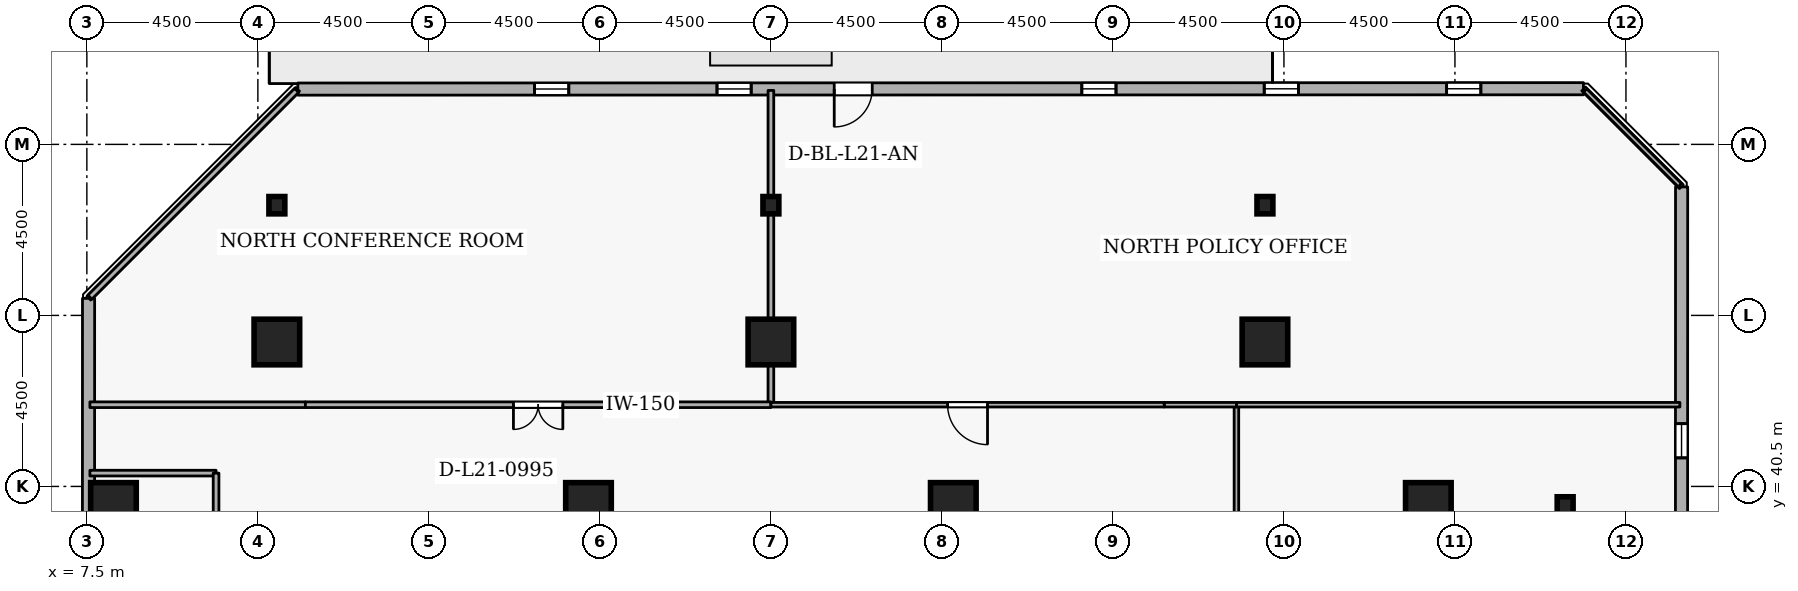
"""IFC4 building model, lengths in metres.
Left out: names, types, materials, properties, quantities, classifications, styles, units other than length and angle.
Written with IfcOpenShell. Run it as: python <this file> out.ifc"""

import sys

from ifc_helpers import new_model, si_unit, direction, frame, frame_2d, origin, origin_2d, place, context, subcontext, project, spatial, rectangle, i_section, extrude, element, fill, save


model = new_model("IFC4")
c1 = context("Model", 3, precision=1e-05, world=origin(), true_north=direction((0.0, 1.0)))
c2 = subcontext(c1, "Body", "Model", "MODEL_VIEW")
j1 = project(units=[si_unit("LENGTHUNIT", "METRE"), si_unit("PLANEANGLEUNIT", "RADIAN")], contexts=[c1])
p1 = place(None, origin())
s1 = spatial("IfcSite", under=j1, at=p1, CompositionType="ELEMENT")
p2 = place(p1, origin())
s2 = spatial("IfcBuilding", under=s1, at=p2, CompositionType="ELEMENT")
p3 = place(p2, frame((0.0, 0.0, 83.7)))
s3 = spatial("IfcBuildingStorey", under=s2, at=p3, CompositionType="ELEMENT", Elevation=83.7)
for number, where, z_axis, x_axis in (
    (1, (42.8, 40.0, 0.0), (0.0, 0.0, 1.0), (1.0, 0.0, 0.0)),
    (2, (12.5, 44.3, 0.0), (0.0, 0.0, 1.0), (1.0, 0.0, 0.0)),
    (3, (25.5, 44.3, 0.0), (0.0, 0.0, 1.0), (1.0, 0.0, 0.0)),
    (4, (38.5, 44.3, 0.0), (0.0, 0.0, 1.0), (1.0, 0.0, 0.0)),
    (5, (8.2, 40.0, 0.0), (0.0, 0.0, 1.0), (1.0, 0.0, 0.0)),
    (6, (20.7, 40.0, 0.0), (0.0, 0.0, 1.0), (1.0, 0.0, 0.0)),
    (7, (30.3, 40.0, 0.0), (0.0, 0.0, 1.0), (1.0, 0.0, 0.0)),
):
    element("IfcColumn", number, at=place(p3, frame(where, z_axis=z_axis, x_axis=x_axis)), inside=s3, PredefinedType="COLUMN", context=c2, shape_type="SweptSolid", body=[
        extrude(rectangle(XDim=1.2, YDim=1.2, at=origin_2d()), origin(), (0.0, 0.0, 1.0), 3.6),
    ])
for number, where, z_axis, x_axis in (
    (8, (46.4, 40.0, 0.0), (0.0, 0.0, 1.0), (1.0, 0.0, 0.0)),
    (9, (12.5, 47.9, 0.0), (0.0, 0.0, 1.0), (1.0, 0.0, 0.0)),
    (10, (25.5, 47.9, 0.0), (0.0, 0.0, 1.0), (1.0, 0.0, 0.0)),
    (11, (38.5, 47.9, 0.0), (0.0, 0.0, 1.0), (1.0, 0.0, 0.0)),
):
    element("IfcColumn", number, at=place(p3, frame(where, z_axis=z_axis, x_axis=x_axis)), inside=s3, PredefinedType="COLUMN", context=c2, shape_type="SweptSolid", body=[
        extrude(i_section(OverallWidth=0.418, OverallDepth=0.456, WebThickness=0.042, FlangeThickness=0.067, FilletRadius=0.015, at=origin_2d()), origin(), (0.0, 0.0, 1.0), 3.6),
    ])
p4 = place(p3, frame((49.455, 14.552, 0.0), z_axis=(0.0, 0.0, 1.0), x_axis=(0.000281454314, 0.999999960392, 0.0)))
e12 = element("IfcWall", 12, at=p4, inside=s3, PredefinedType="STANDARD", context=c2, shape_type="SweptSolid", body=[
    extrude(rectangle(XDim=33.83, YDim=0.32, at=frame_2d((16.915, 0.0))), origin(), (0.0, 0.0, 1.0), 2.7),
])
p5 = place(p4, frame((2.7, 0.0, 0.72)))
e13 = element("IfcOpeningElement", 13, at=p5, cuts=e12, PredefinedType="OPENING", context=c2, shape_type="SweptSolid", body=[
    extrude(rectangle(XDim=0.9, YDim=1.75, at=frame_2d((0.45, 0.875))), frame((0.0, 0.17, 0.0), z_axis=(0.0, -1.0, 0.0), x_axis=(1.0, 0.0, 0.0)), (0.0, 0.0, 1.0), 0.34),
])
p6 = place(p4, frame((7.5, 0.0, 0.72)))
e14 = element("IfcOpeningElement", 14, at=p6, cuts=e12, PredefinedType="OPENING", context=c2, shape_type="SweptSolid", body=[
    extrude(rectangle(XDim=0.9, YDim=1.75, at=frame_2d((0.45, 0.875))), frame((0.0, 0.17, 0.0), z_axis=(0.0, -1.0, 0.0), x_axis=(1.0, 0.0, 0.0)), (0.0, 0.0, 1.0), 0.34),
])
p7 = place(p4, frame((17.1, 0.0, 0.72)))
e15 = element("IfcOpeningElement", 15, at=p7, cuts=e12, PredefinedType="OPENING", context=c2, shape_type="SweptSolid", body=[
    extrude(rectangle(XDim=0.9, YDim=1.75, at=frame_2d((0.45, 0.875))), frame((0.0, 0.17, 0.0), z_axis=(0.0, -1.0, 0.0), x_axis=(1.0, 0.0, 0.0)), (0.0, 0.0, 1.0), 0.34),
])
p8 = place(p4, frame((21.9, 0.0, 0.72)))
e16 = element("IfcOpeningElement", 16, at=p8, cuts=e12, PredefinedType="OPENING", context=c2, shape_type="SweptSolid", body=[
    extrude(rectangle(XDim=0.9, YDim=1.75, at=frame_2d((0.45, 0.875))), frame((0.0, 0.17, 0.0), z_axis=(0.0, -1.0, 0.0), x_axis=(1.0, 0.0, 0.0)), (0.0, 0.0, 1.0), 0.34),
])
p9 = place(p4, frame((26.7, 0.0, 0.72)))
e17 = element("IfcOpeningElement", 17, at=p9, cuts=e12, PredefinedType="OPENING", context=c2, shape_type="SweptSolid", body=[
    extrude(rectangle(XDim=0.9, YDim=1.75, at=frame_2d((0.45, 0.875))), frame((0.0, 0.17, 0.0), z_axis=(0.0, -1.0, 0.0), x_axis=(1.0, 0.0, 0.0)), (0.0, 0.0, 1.0), 0.34),
])
p10 = place(p3, frame((46.881, 50.965, 0.0), z_axis=(0.0, 0.0, 1.0), x_axis=(-0.999999960392, -0.000281454314, 0.0)))
e18 = element("IfcWall", 18, at=p10, inside=s3, PredefinedType="STANDARD", context=c2, shape_type="SweptSolid", body=[
    extrude(rectangle(XDim=33.83, YDim=0.32, at=frame_2d((16.915, 0.0))), origin(), (0.0, 0.0, 1.0), 2.7),
])
p11 = place(p10, frame((18.715, 0.0, 0.0)))
e19 = element("IfcOpeningElement", 19, at=p11, cuts=e18, PredefinedType="OPENING", context=c2, shape_type="SweptSolid", body=[
    extrude(rectangle(XDim=1.0, YDim=2.08, at=frame_2d((0.5, 1.04))), frame((0.0, 0.17, 0.0), z_axis=(0.0, -1.0, 0.0), x_axis=(1.0, 0.0, 0.0)), (0.0, 0.0, 1.0), 0.34),
])
p12 = place(p10, frame((2.7, 0.0, 0.72)))
e20 = element("IfcOpeningElement", 20, at=p12, cuts=e18, PredefinedType="OPENING", context=c2, shape_type="SweptSolid", body=[
    extrude(rectangle(XDim=0.9, YDim=1.75, at=frame_2d((0.45, 0.875))), frame((0.0, 0.17, 0.0), z_axis=(0.0, -1.0, 0.0), x_axis=(1.0, 0.0, 0.0)), (0.0, 0.0, 1.0), 0.34),
])
p13 = place(p10, frame((7.5, 0.0, 0.72)))
e21 = element("IfcOpeningElement", 21, at=p13, cuts=e18, PredefinedType="OPENING", context=c2, shape_type="SweptSolid", body=[
    extrude(rectangle(XDim=0.9, YDim=1.75, at=frame_2d((0.45, 0.875))), frame((0.0, 0.17, 0.0), z_axis=(0.0, -1.0, 0.0), x_axis=(1.0, 0.0, 0.0)), (0.0, 0.0, 1.0), 0.34),
])
p14 = place(p10, frame((12.3, 0.0, 0.72)))
e22 = element("IfcOpeningElement", 22, at=p14, cuts=e18, PredefinedType="OPENING", context=c2, shape_type="SweptSolid", body=[
    extrude(rectangle(XDim=0.9, YDim=1.75, at=frame_2d((0.45, 0.875))), frame((0.0, 0.17, 0.0), z_axis=(0.0, -1.0, 0.0), x_axis=(1.0, 0.0, 0.0)), (0.0, 0.0, 1.0), 0.34),
])
p15 = place(p10, frame((21.9, 0.0, 0.72)))
e23 = element("IfcOpeningElement", 23, at=p15, cuts=e18, PredefinedType="OPENING", context=c2, shape_type="SweptSolid", body=[
    extrude(rectangle(XDim=0.9, YDim=1.75, at=frame_2d((0.45, 0.875))), frame((0.0, 0.17, 0.0), z_axis=(0.0, -1.0, 0.0), x_axis=(1.0, 0.0, 0.0)), (0.0, 0.0, 1.0), 0.34),
])
p16 = place(p10, frame((26.7, 0.0, 0.72)))
e24 = element("IfcOpeningElement", 24, at=p16, cuts=e18, PredefinedType="OPENING", context=c2, shape_type="SweptSolid", body=[
    extrude(rectangle(XDim=0.9, YDim=1.75, at=frame_2d((0.45, 0.875))), frame((0.0, 0.17, 0.0), z_axis=(0.0, -1.0, 0.0), x_axis=(1.0, 0.0, 0.0)), (0.0, 0.0, 1.0), 0.34),
])
p17 = place(p3, frame((7.545, 45.448, 0.0), z_axis=(0.0, 0.0, 1.0), x_axis=(-0.000281454314, -0.999999960392, 0.0)))
e25 = element("IfcWall", 25, at=p17, inside=s3, PredefinedType="STANDARD", context=c2, shape_type="SweptSolid", body=[
    extrude(rectangle(XDim=33.83, YDim=0.32, at=frame_2d((16.915, 0.0))), origin(), (0.0, 0.0, 1.0), 2.7),
])
p18 = place(p17, frame((7.5, 0.0, 0.72)))
e26 = element("IfcOpeningElement", 26, at=p18, cuts=e25, PredefinedType="OPENING", context=c2, shape_type="SweptSolid", body=[
    extrude(rectangle(XDim=0.9, YDim=1.75, at=frame_2d((0.45, 0.875))), frame((0.0, 0.17, 0.0), z_axis=(0.0, -1.0, 0.0), x_axis=(1.0, 0.0, 0.0)), (0.0, 0.0, 1.0), 0.34),
])
p19 = place(p17, frame((12.3, 0.0, 0.72)))
e27 = element("IfcOpeningElement", 27, at=p19, cuts=e25, PredefinedType="OPENING", context=c2, shape_type="SweptSolid", body=[
    extrude(rectangle(XDim=0.9, YDim=1.75, at=frame_2d((0.45, 0.875))), frame((0.0, 0.17, 0.0), z_axis=(0.0, -1.0, 0.0), x_axis=(1.0, 0.0, 0.0)), (0.0, 0.0, 1.0), 0.34),
])
p20 = place(p17, frame((21.9, 0.0, 0.72)))
e28 = element("IfcOpeningElement", 28, at=p20, cuts=e25, PredefinedType="OPENING", context=c2, shape_type="SweptSolid", body=[
    extrude(rectangle(XDim=0.9, YDim=1.75, at=frame_2d((0.45, 0.875))), frame((0.0, 0.17, 0.0), z_axis=(0.0, -1.0, 0.0), x_axis=(1.0, 0.0, 0.0)), (0.0, 0.0, 1.0), 0.34),
])
p21 = place(p17, frame((26.7, 0.0, 0.72)))
e29 = element("IfcOpeningElement", 29, at=p21, cuts=e25, PredefinedType="OPENING", context=c2, shape_type="SweptSolid", body=[
    extrude(rectangle(XDim=0.9, YDim=1.75, at=frame_2d((0.45, 0.875))), frame((0.0, 0.17, 0.0), z_axis=(0.0, -1.0, 0.0), x_axis=(1.0, 0.0, 0.0)), (0.0, 0.0, 1.0), 0.34),
])
p22 = place(p3, frame((7.58, 40.85, 0.0), z_axis=(0.0, 0.0, 1.0), x_axis=(1.0, 0.0, 0.0)))
e30 = element("IfcWall", 30, at=p22, inside=s3, PredefinedType="PARTITIONING", context=c2, shape_type="SweptSolid", body=[
    extrude(rectangle(XDim=3.32, YDim=0.15, at=frame_2d((1.66, 0.0))), origin(), (0.0, 0.0, 1.0), 3.34),
])
p23 = place(p3, frame((10.9, 40.85, 0.0), z_axis=(0.0, 0.0, 1.0), x_axis=(0.0, -1.0, 0.0)))
e31 = element("IfcWall", 31, at=p23, inside=s3, PredefinedType="PARTITIONING", context=c2, shape_type="SweptSolid", body=[
    extrude(rectangle(XDim=4.912, YDim=0.15, at=frame_2d((2.456, 0.0))), origin(), (0.0, 0.0, 1.0), 3.34),
])
p24 = place(p3, frame((37.75, 33.3, 0.0), z_axis=(0.0, 0.0, 1.0), x_axis=(0.0, 1.0, 0.0)))
e32 = element("IfcWall", 32, at=p24, inside=s3, PredefinedType="PARTITIONING", context=c2, shape_type="SweptSolid", body=[
    extrude(rectangle(XDim=9.35, YDim=0.12, at=frame_2d((4.675, 0.0))), origin(), (0.0, 0.0, 1.0), 3.34),
])
p25 = place(p24, frame((4.15, 0.0, 0.0)))
e33 = element("IfcOpeningElement", 33, at=p25, cuts=e32, PredefinedType="OPENING", context=c2, shape_type="SweptSolid", body=[
    extrude(rectangle(XDim=1.05, YDim=2.1, at=frame_2d((0.525, 1.05))), frame((0.0, 0.07, 0.0), z_axis=(0.0, -1.0, 0.0), x_axis=(1.0, 0.0, 0.0)), (0.0, 0.0, 1.0), 0.14),
])
p26 = place(p3, frame((37.75, 42.65, 0.0), z_axis=(0.0, 0.0, 1.0), x_axis=(1.0, 0.0, 0.0)))
e34 = element("IfcWall", 34, at=p26, inside=s3, PredefinedType="PARTITIONING", context=c2, shape_type="SweptSolid", body=[
    extrude(rectangle(XDim=11.67, YDim=0.12, at=frame_2d((5.835, 0.0))), origin(), (0.0, 0.0, 1.0), 3.34),
])
p27 = place(p3, frame((13.25, 42.65, 0.0), z_axis=(0.0, 0.0, 1.0), x_axis=(-1.0, 0.0, 0.0)))
e35 = element("IfcWall", 35, at=p27, inside=s3, PredefinedType="PARTITIONING", context=c2, shape_type="SweptSolid", body=[
    extrude(rectangle(XDim=5.67, YDim=0.15, at=frame_2d((2.835, 0.0))), origin(), (0.0, 0.0, 1.0), 3.34),
])
p28 = place(p3, frame((7.58, 45.48, 0.0), z_axis=(0.0, 0.0, 1.0), x_axis=(0.707106781187, 0.707106781187, 0.0)))
e36 = element("IfcWall", 36, at=p28, inside=s3, PredefinedType="PARTITIONING", context=c2, shape_type="SweptSolid", body=[
    extrude(rectangle(XDim=7.693, YDim=0.15, at=frame_2d((3.846, 0.0))), origin(), (0.0, 0.0, 1.0), 3.34),
])
p29 = place(p3, frame((25.5, 50.92, 0.0), z_axis=(0.0, 0.0, 1.0), x_axis=(0.0, -1.0, 0.0)))
e37 = element("IfcWall", 37, at=p29, inside=s3, PredefinedType="PARTITIONING", context=c2, shape_type="SweptSolid", body=[
    extrude(rectangle(XDim=8.27, YDim=0.15, at=frame_2d((4.135, 0.0))), origin(), (0.0, 0.0, 1.0), 2.882),
])
p30 = place(p3, frame((25.5, 42.65, 0.0), z_axis=(0.0, 0.0, 1.0), x_axis=(-1.0, 0.0, 0.0)))
e38 = element("IfcWall", 38, at=p30, inside=s3, PredefinedType="PARTITIONING", context=c2, shape_type="SweptSolid", body=[
    extrude(rectangle(XDim=12.25, YDim=0.15, at=frame_2d((6.125, 0.0))), origin(), (0.0, 0.0, 1.0), 3.34),
])
p31 = place(p30, frame((5.475, 0.0, 0.0)))
e39 = element("IfcOpeningElement", 39, at=p31, cuts=e38, PredefinedType="OPENING", context=c2, shape_type="SweptSolid", body=[
    extrude(rectangle(XDim=1.3, YDim=2.12, at=frame_2d((0.65, 1.06))), frame((0.0, 0.085, 0.0), z_axis=(0.0, -1.0, 0.0), x_axis=(1.0, 0.0, 0.0)), (0.0, 0.0, 1.0), 0.17),
])
p32 = place(p3, frame((37.75, 42.65, 0.0), z_axis=(0.0, 0.0, 1.0), x_axis=(-1.0, 0.0, 0.0)))
e40 = element("IfcWall", 40, at=p32, inside=s3, PredefinedType="PARTITIONING", context=c2, shape_type="SweptSolid", body=[
    extrude(rectangle(XDim=1.9, YDim=0.12, at=frame_2d((0.95, 0.0))), origin(), (0.0, 0.0, 1.0), 2.895),
])
p33 = place(p3, frame((35.85, 42.65, 0.0), z_axis=(0.0, 0.0, 1.0), x_axis=(-1.0, 0.0, 0.0)))
e41 = element("IfcWall", 41, at=p33, inside=s3, PredefinedType="PARTITIONING", context=c2, shape_type="SweptSolid", body=[
    extrude(rectangle(XDim=10.35, YDim=0.12, at=frame_2d((5.175, 0.0))), origin(), (0.0, 0.0, 1.0), 2.895),
])
p34 = place(p33, frame((4.65, 0.0, 0.0)))
e42 = element("IfcOpeningElement", 42, at=p34, cuts=e41, PredefinedType="OPENING", context=c2, shape_type="SweptSolid", body=[
    extrude(rectangle(XDim=1.05, YDim=2.1, at=frame_2d((0.525, 1.05))), frame((0.0, 0.07, 0.0), z_axis=(0.0, -1.0, 0.0), x_axis=(1.0, 0.0, 0.0)), (0.0, 0.0, 1.0), 0.14),
])
p35 = place(p3, frame((46.925, 50.92, 0.0), z_axis=(0.0, 0.0, 1.0), x_axis=(0.707106781187, -0.707106781187, 0.0)))
e43 = element("IfcWall", 43, at=p35, inside=s3, PredefinedType="PARTITIONING", context=c2, shape_type="SweptSolid", body=[
    extrude(rectangle(XDim=3.528, YDim=0.12, at=frame_2d((1.764, 0.0))), origin(), (0.0, 0.0, 1.0), 3.34),
])
p36 = place(p9, origin())
e44 = element("IfcWindow", 44, at=p36, inside=s3, PartitioningType="SINGLE_PANEL", PredefinedType="WINDOW", context=c2, shape_type="SweptSolid", body=[
    extrude(rectangle(XDim=0.9, YDim=1.75, at=frame_2d((0.45, 0.875))), frame((0.0, 0.03, 0.0), z_axis=(0.0, -1.0, 0.0), x_axis=(1.0, 0.0, 0.0)), (0.0, 0.0, 1.0), 0.06),
])
fill(e17, e44)
p37 = place(p11, origin())
e45 = element("IfcDoor", 45, at=p37, inside=s3, OperationType="SINGLE_SWING_RIGHT", PredefinedType="DOOR", context=c2, shape_type="SweptSolid", body=[
    extrude(rectangle(XDim=1.0, YDim=2.08, at=frame_2d((0.5, 1.04))), frame((0.0, 0.025, 0.0), z_axis=(0.0, -1.0, 0.0), x_axis=(1.0, 0.0, 0.0)), (0.0, 0.0, 1.0), 0.05),
])
fill(e19, e45)
p38 = place(p12, origin())
e46 = element("IfcWindow", 46, at=p38, inside=s3, PartitioningType="SINGLE_PANEL", PredefinedType="WINDOW", context=c2, shape_type="SweptSolid", body=[
    extrude(rectangle(XDim=0.9, YDim=1.75, at=frame_2d((0.45, 0.875))), frame((0.0, 0.03, 0.0), z_axis=(0.0, -1.0, 0.0), x_axis=(1.0, 0.0, 0.0)), (0.0, 0.0, 1.0), 0.06),
])
fill(e20, e46)
p39 = place(p13, origin())
e47 = element("IfcWindow", 47, at=p39, inside=s3, PartitioningType="SINGLE_PANEL", PredefinedType="WINDOW", context=c2, shape_type="SweptSolid", body=[
    extrude(rectangle(XDim=0.9, YDim=1.75, at=frame_2d((0.45, 0.875))), frame((0.0, 0.03, 0.0), z_axis=(0.0, -1.0, 0.0), x_axis=(1.0, 0.0, 0.0)), (0.0, 0.0, 1.0), 0.06),
])
fill(e21, e47)
p40 = place(p14, origin())
e48 = element("IfcWindow", 48, at=p40, inside=s3, PartitioningType="SINGLE_PANEL", PredefinedType="WINDOW", context=c2, shape_type="SweptSolid", body=[
    extrude(rectangle(XDim=0.9, YDim=1.75, at=frame_2d((0.45, 0.875))), frame((0.0, 0.03, 0.0), z_axis=(0.0, -1.0, 0.0), x_axis=(1.0, 0.0, 0.0)), (0.0, 0.0, 1.0), 0.06),
])
fill(e22, e48)
p41 = place(p15, origin())
e49 = element("IfcWindow", 49, at=p41, inside=s3, PartitioningType="SINGLE_PANEL", PredefinedType="WINDOW", context=c2, shape_type="SweptSolid", body=[
    extrude(rectangle(XDim=0.9, YDim=1.75, at=frame_2d((0.45, 0.875))), frame((0.0, 0.03, 0.0), z_axis=(0.0, -1.0, 0.0), x_axis=(1.0, 0.0, 0.0)), (0.0, 0.0, 1.0), 0.06),
])
fill(e23, e49)
p42 = place(p16, origin())
e50 = element("IfcWindow", 50, at=p42, inside=s3, PartitioningType="SINGLE_PANEL", PredefinedType="WINDOW", context=c2, shape_type="SweptSolid", body=[
    extrude(rectangle(XDim=0.9, YDim=1.75, at=frame_2d((0.45, 0.875))), frame((0.0, 0.03, 0.0), z_axis=(0.0, -1.0, 0.0), x_axis=(1.0, 0.0, 0.0)), (0.0, 0.0, 1.0), 0.06),
])
fill(e24, e50)
p43 = place(p31, origin())
e51 = element("IfcDoor", 51, at=p43, inside=s3, OperationType="DOUBLE_DOOR_SINGLE_SWING", PredefinedType="DOOR", context=c2, shape_type="SweptSolid", body=[
    extrude(rectangle(XDim=1.3, YDim=2.12, at=frame_2d((0.65, 1.06))), frame((0.0, 0.025, 0.0), z_axis=(0.0, -1.0, 0.0), x_axis=(1.0, 0.0, 0.0)), (0.0, 0.0, 1.0), 0.05),
])
fill(e39, e51)
p44 = place(p34, origin())
e52 = element("IfcDoor", 52, at=p44, inside=s3, OperationType="SINGLE_SWING_LEFT", PredefinedType="DOOR", context=c2, shape_type="SweptSolid", body=[
    extrude(rectangle(XDim=1.05, YDim=2.1, at=frame_2d((0.525, 1.05))), frame((0.0, 0.025, 0.0), z_axis=(0.0, -1.0, 0.0), x_axis=(1.0, 0.0, 0.0)), (0.0, 0.0, 1.0), 0.05),
])
fill(e42, e52)
save(model, sys.argv[1])
